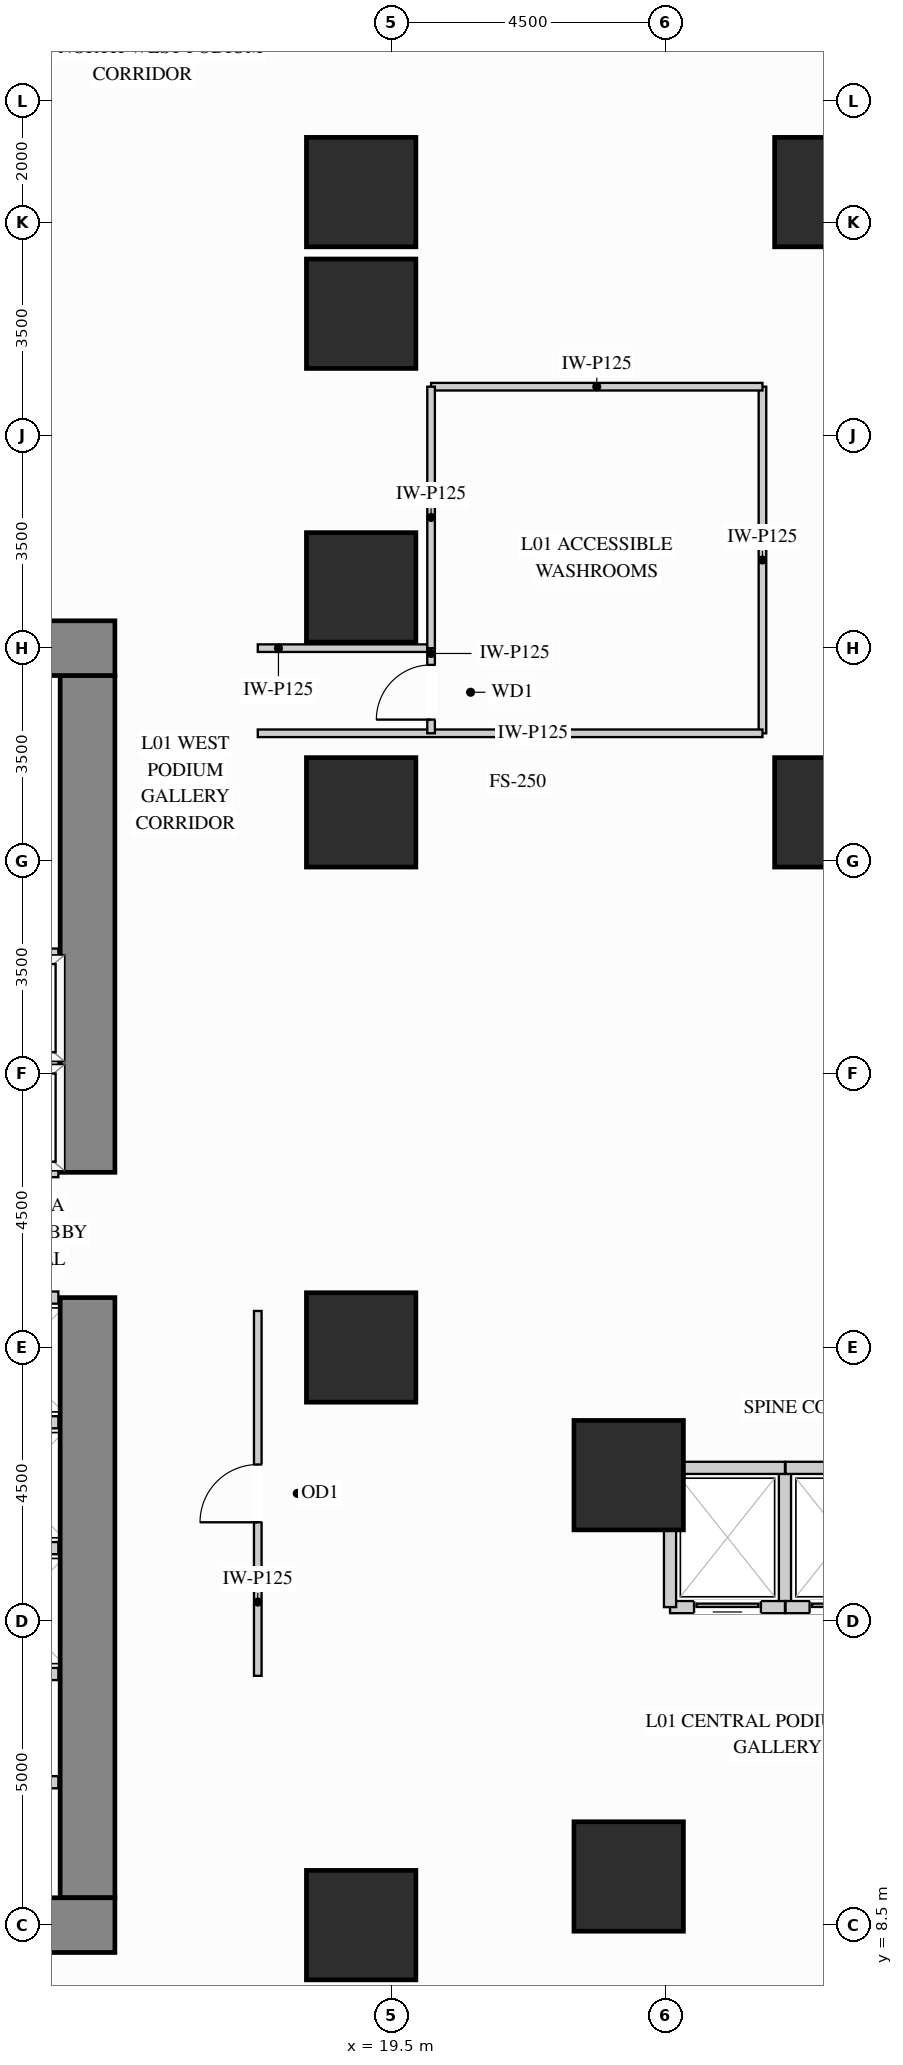
"""IFC4 building model, lengths in metres.
Left out: names, types, materials, properties, quantities, classifications, styles, units other than length and angle.
Written with IfcOpenShell. Run it as: python <this file> out.ifc"""

import sys

from ifc_helpers import new_model, si_unit, direction, frame, frame_2d, origin, origin_2d, place, context, subcontext, project, spatial, rectangle, extrude, source, transform, mapped, element, fill, save


model = new_model("IFC4")
c1 = context("Model", 3, precision=1e-05, world=origin(), true_north=direction((0.0, 1.0)))
c2 = subcontext(c1, "Body", "Model", "MODEL_VIEW")
j1 = project(units=[si_unit("LENGTHUNIT", "METRE"), si_unit("PLANEANGLEUNIT", "RADIAN")], contexts=[c1])
p1 = place(None, origin())
s1 = spatial("IfcSite", under=j1, at=p1, CompositionType="ELEMENT")
p2 = place(p1, origin())
s2 = spatial("IfcBuilding", under=s1, at=p2, CompositionType="ELEMENT")
p3 = place(p2, frame((0.0, 0.0, 4.5)))
s3 = spatial("IfcBuildingStorey", under=s2, at=p3, CompositionType="ELEMENT", Elevation=4.5)
m1 = source(origin(), c2, "Body", "SweptSolid", [
    extrude(rectangle(XDim=1.8, YDim=1.8, at=origin_2d()), origin(), (0.0, 0.0, 1.0), 4.25),
])
for number, where, z_axis, x_axis in (
    (1, (26.7, 26.8, 0.0), (0.0, 0.0, 1.0), (1.0, 0.0, 0.0)),
    (2, (26.7, 37.0, 0.0), (0.0, 0.0, 1.0), (1.0, 0.0, 0.0)),
    (3, (19.0, 8.5, 0.0), (0.0, 0.0, 1.0), (1.0, 0.0, 0.0)),
    (4, (19.0, 18.0, 0.0), (0.0, 0.0, 1.0), (1.0, 0.0, 0.0)),
    (5, (19.0, 26.8, 0.0), (0.0, 0.0, 1.0), (1.0, 0.0, 0.0)),
    (6, (19.0, 30.5, 0.0), (0.0, 0.0, 1.0), (1.0, 0.0, 0.0)),
    (7, (19.0, 35.0, 0.0), (0.0, 0.0, 1.0), (1.0, 0.0, 0.0)),
    (8, (19.0, 37.0, 0.0), (0.0, 0.0, 1.0), (1.0, 0.0, 0.0)),
    (9, (23.4, 9.3, 0.0), (0.0, 0.0, 1.0), (1.0, 0.0, 0.0)),
    (10, (23.4, 15.9, 0.0), (0.0, 0.0, 1.0), (1.0, 0.0, 0.0)),
):
    element("IfcColumn", number, at=place(p3, frame(where, z_axis=z_axis, x_axis=x_axis)), inside=s3, PredefinedType="COLUMN", context=c2, shape_type="MappedRepresentation", body=[
        mapped(m1, transform((0.0, 0.0, 0.0), x_axis=(1.0, 0.0, 0.0), y_axis=(0.0, 1.0, 0.0), z_axis=(0.0, 0.0, 1.0))),
    ])
m2 = source(origin(), c2, "Body", "SweptSolid", [
    extrude(rectangle(XDim=9.87, YDim=0.9, at=frame_2d((4.935, 0.0))), origin(), (0.0, 0.0, 1.0), 4.25),
])
p4 = place(p3, frame((14.5, 8.95, 0.0), z_axis=(0.0, 0.0, 1.0), x_axis=(0.0, 1.0, 0.0)))
e11 = element("IfcWall", 11, at=p4, inside=s3, PredefinedType="SHEAR", context=c2, shape_type="MappedRepresentation", body=[
    mapped(m2, transform((0.0, 0.0, 0.0), x_axis=(1.0, 0.0, 0.0), y_axis=(0.0, 1.0, 0.0), z_axis=(0.0, 0.0, 1.0))),
])
m3 = source(origin(), c2, "Body", "SweptSolid", [
    extrude(rectangle(XDim=8.17, YDim=0.9, at=frame_2d((4.085, 0.0))), origin(), (0.0, 0.0, 1.0), 4.25),
])
p5 = place(p3, frame((14.5, 20.88, 0.0), z_axis=(0.0, 0.0, 1.0), x_axis=(0.0, 1.0, 0.0)))
e12 = element("IfcWall", 12, at=p5, inside=s3, PredefinedType="SHEAR", context=c2, shape_type="MappedRepresentation", body=[
    mapped(m3, transform((0.0, 0.0, 0.0), x_axis=(1.0, 0.0, 0.0), y_axis=(0.0, 1.0, 0.0), z_axis=(0.0, 0.0, 1.0))),
])
m4 = source(origin(), c2, "Body", "SweptSolid", [
    extrude(rectangle(XDim=10.9, YDim=0.9, at=frame_2d((5.45, 0.0))), origin(), (0.0, 0.0, 1.0), 4.25),
])
for number, where, z_axis, x_axis in (
    (13, (4.05, 29.5, 0.0), (0.0, 0.0, 1.0), (1.0, 0.0, 0.0)),
    (14, (4.05, 8.5, 0.0), (0.0, 0.0, 1.0), (1.0, 0.0, 0.0)),
):
    element("IfcWall", number, at=place(p3, frame(where, z_axis=z_axis, x_axis=x_axis)), inside=s3, PredefinedType="SHEAR", context=c2, shape_type="MappedRepresentation", body=[
        mapped(m4, transform((0.0, 0.0, 0.0), x_axis=(1.0, 0.0, 0.0), y_axis=(0.0, 1.0, 0.0), z_axis=(0.0, 0.0, 1.0))),
    ])
p6 = place(p3, frame((17.3, 12.6, 0.0), z_axis=(0.0, 0.0, 1.0), x_axis=(0.0, 1.0, 0.0)))
e15 = element("IfcWall", 15, at=p6, inside=s3, PredefinedType="PARTITIONING", context=c2, shape_type="SweptSolid", body=[
    extrude(rectangle(XDim=6.0, YDim=0.125, at=frame_2d((3.0, 0.0))), origin(), (0.0, 0.0, 1.0), 4.235),
])
p7 = place(p6, frame((2.525, 0.0, 0.0)))
e16 = element("IfcOpeningElement", 16, at=p7, cuts=e15, PredefinedType="OPENING", context=c2, shape_type="SweptSolid", body=[
    extrude(rectangle(XDim=0.95, YDim=2.15, at=frame_2d((0.475, 1.075))), frame((0.0, 0.073, 0.0), z_axis=(0.0, -1.0, 0.0), x_axis=(1.0, 0.0, 0.0)), (0.0, 0.0, 1.0), 0.145),
])
m5 = source(origin(), c2, "Body", "SweptSolid", [
    extrude(rectangle(XDim=5.7, YDim=0.125, at=frame_2d((2.85, 0.0))), origin(), (0.0, 0.0, 1.0), 4.235),
])
p8 = place(p3, frame((25.6, 28.1, 0.0), z_axis=(0.0, 0.0, 1.0), x_axis=(0.0, 1.0, 0.0)))
e17 = element("IfcWall", 17, at=p8, inside=s3, PredefinedType="PARTITIONING", context=c2, shape_type="MappedRepresentation", body=[
    mapped(m5, transform((0.0, 0.0, 0.0), x_axis=(1.0, 0.0, 0.0), y_axis=(0.0, 1.0, 0.0), z_axis=(0.0, 0.0, 1.0))),
])
m6 = source(origin(), c2, "Body", "SweptSolid", [
    extrude(rectangle(XDim=2.85, YDim=0.125, at=frame_2d((1.425, 0.0))), origin(), (0.0, 0.0, 1.0), 4.235),
])
p9 = place(p3, frame((17.3, 29.5, 0.0), z_axis=(0.0, 0.0, 1.0), x_axis=(1.0, 0.0, 0.0)))
e18 = element("IfcWall", 18, at=p9, inside=s3, PredefinedType="PARTITIONING", context=c2, shape_type="MappedRepresentation", body=[
    mapped(m6, transform((0.0, 0.0, 0.0), x_axis=(1.0, 0.0, 0.0), y_axis=(0.0, 1.0, 0.0), z_axis=(0.0, 0.0, 1.0))),
])
m7 = source(origin(), c2, "Body", "SweptSolid", [
    extrude(rectangle(XDim=5.45, YDim=0.125, at=frame_2d((2.725, 0.0))), origin(), (0.0, 0.0, 1.0), 4.235),
])
p10 = place(p3, frame((20.15, 33.8, 0.0), z_axis=(0.0, 0.0, 1.0), x_axis=(1.0, 0.0, 0.0)))
e19 = element("IfcWall", 19, at=p10, inside=s3, PredefinedType="PARTITIONING", context=c2, shape_type="MappedRepresentation", body=[
    mapped(m7, transform((0.0, 0.0, 0.0), x_axis=(1.0, 0.0, 0.0), y_axis=(0.0, 1.0, 0.0), z_axis=(0.0, 0.0, 1.0))),
])
m8 = source(origin(), c2, "Body", "SweptSolid", [
    extrude(rectangle(XDim=8.3, YDim=0.125, at=frame_2d((4.15, 0.0))), origin(), (0.0, 0.0, 1.0), 4.235),
])
p11 = place(p3, frame((17.3, 28.1, 0.0), z_axis=(0.0, 0.0, 1.0), x_axis=(1.0, 0.0, 0.0)))
e20 = element("IfcWall", 20, at=p11, inside=s3, PredefinedType="PARTITIONING", context=c2, shape_type="MappedRepresentation", body=[
    mapped(m8, transform((0.0, 0.0, 0.0), x_axis=(1.0, 0.0, 0.0), y_axis=(0.0, 1.0, 0.0), z_axis=(0.0, 0.0, 1.0))),
])
m9 = source(origin(), c2, "Body", "SweptSolid", [
    extrude(rectangle(XDim=4.3, YDim=0.125, at=frame_2d((2.15, 0.0))), origin(), (0.0, 0.0, 1.0), 4.235),
])
p12 = place(p3, frame((20.15, 29.5, 0.0), z_axis=(0.0, 0.0, 1.0), x_axis=(0.0, 1.0, 0.0)))
e21 = element("IfcWall", 21, at=p12, inside=s3, PredefinedType="PARTITIONING", context=c2, shape_type="MappedRepresentation", body=[
    mapped(m9, transform((0.0, 0.0, 0.0), x_axis=(1.0, 0.0, 0.0), y_axis=(0.0, 1.0, 0.0), z_axis=(0.0, 0.0, 1.0))),
])
p13 = place(p3, frame((20.15, 28.1, 0.0), z_axis=(0.0, 0.0, 1.0), x_axis=(0.0, 1.0, 0.0)))
e22 = element("IfcWall", 22, at=p13, inside=s3, PredefinedType="PARTITIONING", context=c2, shape_type="SweptSolid", body=[
    extrude(rectangle(XDim=1.4, YDim=0.125, at=frame_2d((0.7, 0.0))), origin(), (0.0, 0.0, 1.0), 4.235),
])
p14 = place(p13, frame((0.225, 0.0, 0.0)))
e23 = element("IfcOpeningElement", 23, at=p14, cuts=e22, PredefinedType="OPENING", context=c2, shape_type="SweptSolid", body=[
    extrude(rectangle(XDim=0.9, YDim=2.15, at=frame_2d((0.45, 1.075))), frame((0.0, 0.073, 0.0), z_axis=(0.0, -1.0, 0.0), x_axis=(1.0, 0.0, 0.0)), (0.0, 0.0, 1.0), 0.145),
])
m10 = source(origin(), c2, "Body", "SweptSolid", [
    extrude(rectangle(XDim=1.6, YDim=0.2, at=frame_2d((0.8, 0.0))), origin(), (0.0, 0.0, 1.0), 4.235),
])
p15 = place(p3, frame((12.42, 10.85, 0.0), z_axis=(0.0, 0.0, 1.0), x_axis=(1.0, 0.0, 0.0)))
e24 = element("IfcWall", 24, at=p15, inside=s3, PredefinedType="PARTITIONING", context=c2, shape_type="MappedRepresentation", body=[
    mapped(m10, transform((0.0, 0.0, 0.0), x_axis=(1.0, 0.0, 0.0), y_axis=(0.0, 1.0, 0.0), z_axis=(0.0, 0.0, 1.0))),
])
m11 = source(origin(), c2, "Body", "SweptSolid", [
    extrude(rectangle(XDim=2.19, YDim=0.2, at=frame_2d((1.095, 0.0))), origin(), (0.0, 0.0, 1.0), 4.235),
])
for number, where, z_axis, x_axis in (
    (25, (11.83, 22.66, 0.0), (0.0, 0.0, 1.0), (1.0, 0.0, 0.0)),
    (26, (11.83, 20.9, 0.0), (0.0, 0.0, 1.0), (1.0, 0.0, 0.0)),
    (27, (11.83, 24.46, 0.0), (0.0, 0.0, 1.0), (1.0, 0.0, 0.0)),
):
    element("IfcWall", number, at=place(p3, frame(where, z_axis=z_axis, x_axis=x_axis)), inside=s3, PredefinedType="PARTITIONING", context=c2, shape_type="MappedRepresentation", body=[
        mapped(m11, transform((0.0, 0.0, 0.0), x_axis=(1.0, 0.0, 0.0), y_axis=(0.0, 1.0, 0.0), z_axis=(0.0, 0.0, 1.0))),
    ])
m12 = source(origin(), c2, "Body", "SweptSolid", [
    extrude(rectangle(XDim=1.79, YDim=0.2, at=frame_2d((0.895, 0.0))), origin(), (0.0, 0.0, 1.0), 4.235),
])
for number, where, z_axis, x_axis in (
    (28, (12.23, 14.7, 0.0), (0.0, 0.0, 1.0), (1.0, 0.0, 0.0)),
    (29, (12.23, 12.63, 0.0), (0.0, 0.0, 1.0), (1.0, 0.0, 0.0)),
    (30, (12.23, 16.77, 0.0), (0.0, 0.0, 1.0), (1.0, 0.0, 0.0)),
    (31, (12.23, 18.82, 0.0), (0.0, 0.0, 1.0), (1.0, 0.0, 0.0)),
):
    element("IfcWall", number, at=place(p3, frame(where, z_axis=z_axis, x_axis=x_axis)), inside=s3, PredefinedType="PARTITIONING", context=c2, shape_type="MappedRepresentation", body=[
        mapped(m12, transform((0.0, 0.0, 0.0), x_axis=(1.0, 0.0, 0.0), y_axis=(0.0, 1.0, 0.0), z_axis=(0.0, 0.0, 1.0))),
    ])
m13 = source(origin(), c2, "Body", "SweptSolid", [
    extrude(rectangle(XDim=2.29, YDim=0.2, at=frame_2d((1.145, 0.0))), origin(), (0.0, 0.0, 1.0), 4.235),
])
p16 = place(p3, frame((25.97, 13.73, 0.0), z_axis=(0.0, 0.0, 1.0), x_axis=(0.0, 1.0, 0.0)))
e32 = element("IfcWall", 32, at=p16, inside=s3, PredefinedType="PARTITIONING", context=c2, shape_type="MappedRepresentation", body=[
    mapped(m13, transform((0.0, 0.0, 0.0), x_axis=(1.0, 0.0, 0.0), y_axis=(0.0, 1.0, 0.0), z_axis=(0.0, 0.0, 1.0))),
])
m14 = source(origin(), c2, "Body", "SweptSolid", [
    extrude(rectangle(XDim=1.89, YDim=0.2, at=frame_2d((0.945, 0.0))), origin(), (0.0, 0.0, 1.0), 4.235),
])
p17 = place(p3, frame((24.08, 16.02, 0.0), z_axis=(0.0, 0.0, 1.0), x_axis=(1.0, 0.0, 0.0)))
e33 = element("IfcWall", 33, at=p17, inside=s3, PredefinedType="PARTITIONING", context=c2, shape_type="MappedRepresentation", body=[
    mapped(m14, transform((0.0, 0.0, 0.0), x_axis=(1.0, 0.0, 0.0), y_axis=(0.0, 1.0, 0.0), z_axis=(0.0, 0.0, 1.0))),
])
p18 = place(p3, frame((24.08, 13.73, 0.0), z_axis=(0.0, 0.0, 1.0), x_axis=(1.0, 0.0, 0.0)))
e34 = element("IfcWall", 34, at=p18, inside=s3, PredefinedType="PARTITIONING", context=c2, shape_type="SweptSolid", body=[
    extrude(rectangle(XDim=1.89, YDim=0.2, at=frame_2d((0.945, 0.0))), origin(), (0.0, 0.0, 1.0), 4.235),
])
p19 = place(p18, frame((0.395, 0.0, 0.0)))
e35 = element("IfcOpeningElement", 35, at=p19, cuts=e34, PredefinedType="OPENING", context=c2, shape_type="SweptSolid", body=[
    extrude(rectangle(XDim=1.1, YDim=2.2, at=frame_2d((0.55, 1.1))), frame((0.0, 0.11, 0.0), z_axis=(0.0, -1.0, 0.0), x_axis=(1.0, 0.0, 0.0)), (0.0, 0.0, 1.0), 0.22),
])
p20 = place(p3, frame((24.08, 13.73, 0.0), z_axis=(0.0, 0.0, 1.0), x_axis=(0.0, 1.0, 0.0)))
e36 = element("IfcWall", 36, at=p20, inside=s3, PredefinedType="PARTITIONING", context=c2, shape_type="MappedRepresentation", body=[
    mapped(m13, transform((0.0, 0.0, 0.0), x_axis=(1.0, 0.0, 0.0), y_axis=(0.0, 1.0, 0.0), z_axis=(0.0, 0.0, 1.0))),
])
m15 = source(origin(), c2, "Body", "SweptSolid", [
    extrude(rectangle(XDim=1.89, YDim=0.2, at=frame_2d((0.945, 0.0))), origin(), (0.0, 0.0, 1.0), 4.235),
])
p21 = place(p3, frame((25.98, 16.02, 0.0), z_axis=(0.0, 0.0, 1.0), x_axis=(1.0, 0.0, 0.0)))
e37 = element("IfcWall", 37, at=p21, inside=s3, PredefinedType="PARTITIONING", context=c2, shape_type="MappedRepresentation", body=[
    mapped(m15, transform((0.0, 0.0, 0.0), x_axis=(1.0, 0.0, 0.0), y_axis=(0.0, 1.0, 0.0), z_axis=(0.0, 0.0, 1.0))),
])
p22 = place(p3, frame((25.98, 13.73, 0.0), z_axis=(0.0, 0.0, 1.0), x_axis=(1.0, 0.0, 0.0)))
e38 = element("IfcWall", 38, at=p22, inside=s3, PredefinedType="PARTITIONING", context=c2, shape_type="SweptSolid", body=[
    extrude(rectangle(XDim=1.89, YDim=0.2, at=frame_2d((0.945, 0.0))), origin(), (0.0, 0.0, 1.0), 4.235),
])
p23 = place(p22, frame((0.395, 0.0, 0.0)))
e39 = element("IfcOpeningElement", 39, at=p23, cuts=e38, PredefinedType="OPENING", context=c2, shape_type="SweptSolid", body=[
    extrude(rectangle(XDim=1.1, YDim=2.2, at=frame_2d((0.55, 1.1))), frame((0.0, 0.11, 0.0), z_axis=(0.0, -1.0, 0.0), x_axis=(1.0, 0.0, 0.0)), (0.0, 0.0, 1.0), 0.22),
])
m16 = source(origin(), c2, "Body", "SweptSolid", [
    extrude(rectangle(XDim=1.1, YDim=2.2, at=frame_2d((0.55, 1.1))), frame((0.0, 0.025, 0.0), z_axis=(0.0, -1.0, 0.0), x_axis=(1.0, 0.0, 0.0)), (0.0, 0.0, 1.0), 0.05),
])
p24 = place(p19, origin())
e40 = element("IfcDoor", 40, at=p24, inside=s3, OperationType="SLIDING_TO_LEFT", PredefinedType="DOOR", context=c2, shape_type="MappedRepresentation", body=[
    mapped(m16, transform((0.0, 0.0, 0.0), x_axis=(1.0, 0.0, 0.0), y_axis=(0.0, 1.0, 0.0), z_axis=(0.0, 0.0, 1.0))),
])
fill(e35, e40)
p25 = place(p23, origin())
e41 = element("IfcDoor", 41, at=p25, inside=s3, OperationType="SLIDING_TO_LEFT", PredefinedType="DOOR", context=c2, shape_type="MappedRepresentation", body=[
    mapped(m16, transform((0.0, 0.0, 0.0), x_axis=(1.0, 0.0, 0.0), y_axis=(0.0, 1.0, 0.0), z_axis=(0.0, 0.0, 1.0))),
])
fill(e39, e41)
m17 = source(origin(), c2, "Body", "SweptSolid", [
    extrude(rectangle(XDim=0.95, YDim=2.15, at=frame_2d((0.475, 1.075))), frame((0.0, 0.025, 0.0), z_axis=(0.0, -1.0, 0.0), x_axis=(1.0, 0.0, 0.0)), (0.0, 0.0, 1.0), 0.05),
])
p26 = place(p7, origin())
e42 = element("IfcDoor", 42, at=p26, inside=s3, OperationType="SINGLE_SWING_LEFT", PredefinedType="DOOR", context=c2, shape_type="MappedRepresentation", body=[
    mapped(m17, transform((0.0, 0.0, 0.0), x_axis=(1.0, 0.0, 0.0), y_axis=(0.0, 1.0, 0.0), z_axis=(0.0, 0.0, 1.0))),
])
fill(e16, e42)
m18 = source(origin(), c2, "Body", "SweptSolid", [
    extrude(rectangle(XDim=0.9, YDim=2.15, at=frame_2d((0.45, 1.075))), frame((0.0, 0.025, 0.0), z_axis=(0.0, -1.0, 0.0), x_axis=(1.0, 0.0, 0.0)), (0.0, 0.0, 1.0), 0.05),
])
p27 = place(p14, origin())
e43 = element("IfcDoor", 43, at=p27, inside=s3, OperationType="SINGLE_SWING_LEFT", PredefinedType="DOOR", context=c2, shape_type="MappedRepresentation", body=[
    mapped(m18, transform((0.0, 0.0, 0.0), x_axis=(1.0, 0.0, 0.0), y_axis=(0.0, 1.0, 0.0), z_axis=(0.0, 0.0, 1.0))),
])
fill(e23, e43)
save(model, sys.argv[1])
